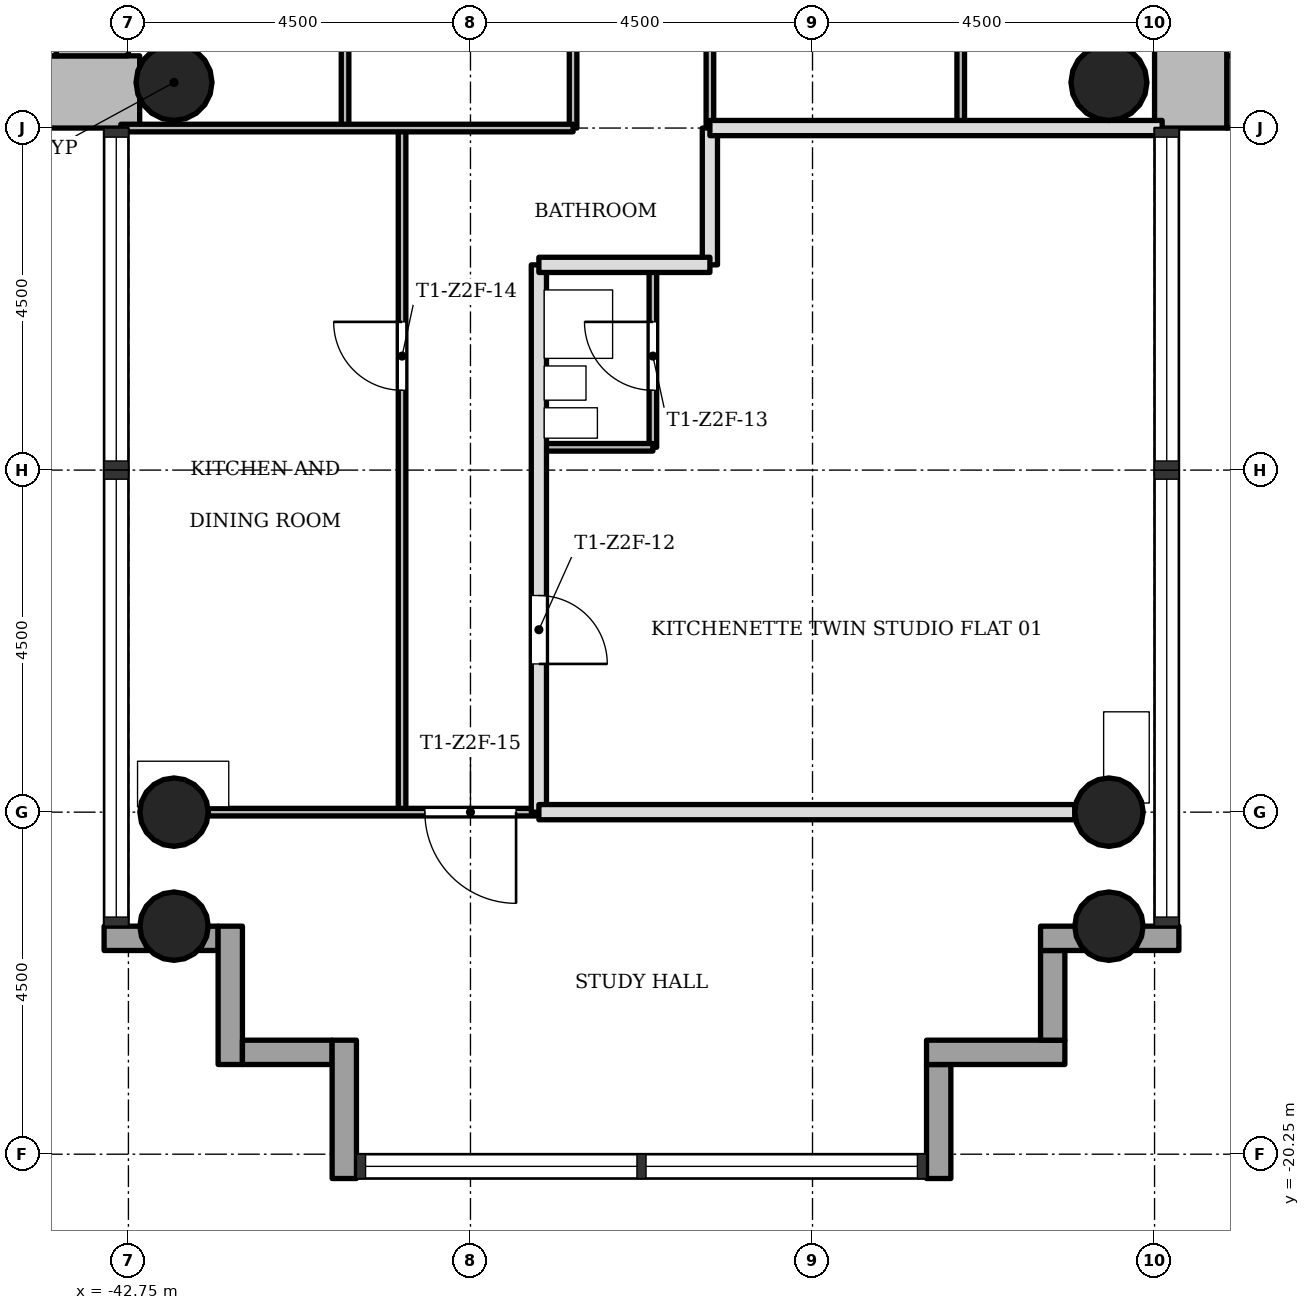
"""IFC4 building model, lengths in metres.
Left out: names, types, materials, properties, quantities, classifications, styles, units other than length and angle.
Written with IfcOpenShell. Run it as: python <this file> out.ifc"""

import sys

from ifc_helpers import new_model, si_unit, direction, frame, frame_2d, origin, origin_2d, place, context, subcontext, project, spatial, rectangle, hollow_circle, extrude, element, fill, save


model = new_model("IFC4")
c1 = context("Model", 3, precision=1e-05, world=origin(), true_north=direction((0.0, 1.0)))
c2 = subcontext(c1, "Body", "Model", "MODEL_VIEW")
j1 = project(units=[si_unit("LENGTHUNIT", "METRE"), si_unit("PLANEANGLEUNIT", "RADIAN")], contexts=[c1])
p1 = place(None, origin())
s1 = spatial("IfcSite", under=j1, at=p1, CompositionType="ELEMENT")
p2 = place(p1, origin())
s2 = spatial("IfcBuilding", under=s1, at=p2, CompositionType="ELEMENT")
p3 = place(p2, frame((0.0, 0.0, 110.6)))
s3 = spatial("IfcBuildingStorey", under=s2, at=p3, CompositionType="ELEMENT", Elevation=110.6)
p4 = place(p3, frame((-28.3, -6.275, 0.0), z_axis=(0.0, 0.0, 1.0), x_axis=(1.0, 0.0, 0.0)))
e1 = element("IfcWall", 1, at=p4, inside=s3, PredefinedType="SHEAR", context=c2, shape_type="SweptSolid", body=[
    extrude(rectangle(XDim=8.05, YDim=0.95, at=frame_2d((4.025, 0.0))), origin(), (0.0, 0.0, 1.0), 3.4),
])
p5 = place(p3, frame((-28.775, 5.8, 0.0), z_axis=(0.0, 0.0, 1.0), x_axis=(0.0, -1.0, 0.0)))
e2 = element("IfcWall", 2, at=p5, inside=s3, PredefinedType="SHEAR", context=c2, shape_type="SweptSolid", body=[
    extrude(rectangle(XDim=12.55, YDim=0.95, at=frame_2d((6.275, 0.0))), origin(), (0.0, 0.0, 1.0), 3.4),
])
p6 = place(p5, frame((4.9, 0.0, 0.0)))
e3 = element("IfcOpeningElement", 3, at=p6, cuts=e2, PredefinedType="OPENING", context=c2, shape_type="SweptSolid", body=[
    extrude(rectangle(XDim=1.8, YDim=2.1, at=frame_2d((0.9, 1.05))), frame((0.0, 0.485, 0.0), z_axis=(0.0, -1.0, 0.0), x_axis=(1.0, 0.0, 0.0)), (0.0, 0.0, 1.0), 0.97),
])
p7 = place(p3, frame((-51.298, -6.275, 0.0), z_axis=(0.0, 0.0, 1.0), x_axis=(1.0, 0.0, 0.0)))
e4 = element("IfcWall", 4, at=p7, inside=s3, PredefinedType="SHEAR", context=c2, shape_type="SweptSolid", body=[
    extrude(rectangle(XDim=8.696, YDim=0.95, at=frame_2d((4.348, 0.0))), origin(), (0.0, 0.0, 1.0), 3.4),
])
p8 = place(p3, frame((-43.225, -5.8, 0.0), z_axis=(0.0, 0.0, 1.0), x_axis=(0.0, 1.0, 0.0)))
e5 = element("IfcWall", 5, at=p8, inside=s3, PredefinedType="SHEAR", context=c2, shape_type="SweptSolid", body=[
    extrude(rectangle(XDim=12.55, YDim=0.95, at=frame_2d((6.275, 0.0))), origin(), (0.0, 0.0, 1.0), 3.4),
])
p9 = place(p8, frame((4.9, 0.0, 0.0)))
e6 = element("IfcOpeningElement", 6, at=p9, cuts=e5, PredefinedType="OPENING", context=c2, shape_type="SweptSolid", body=[
    extrude(rectangle(XDim=1.8, YDim=2.1, at=frame_2d((0.9, 1.05))), frame((0.0, 0.485, 0.0), z_axis=(0.0, -1.0, 0.0), x_axis=(1.0, 0.0, 0.0)), (0.0, 0.0, 1.0), 0.97),
])
for number, where, z_axis, x_axis in (
    (7, (-42.15, -15.75, 0.0), (0.0, 0.0, 1.0), (1.0, 0.0, 0.0)),
    (8, (-29.85, -15.75, 0.0), (0.0, 0.0, 1.0), (1.0, 0.0, 0.0)),
    (9, (-42.15, -17.25, 0.0), (0.0, 0.0, 1.0), (1.0, 0.0, 0.0)),
    (10, (-29.85, -17.25, 0.0), (0.0, 0.0, 1.0), (1.0, 0.0, 0.0)),
):
    element("IfcColumn", number, at=place(p3, frame(where, z_axis=z_axis, x_axis=x_axis)), inside=s3, PredefinedType="COLUMN", context=c2, shape_type="SweptSolid", body=[
        extrude(hollow_circle(Radius=0.45, WallThickness=0.032, at=origin_2d()), origin(), (0.0, 0.0, 1.0), 3.4),
    ])
for number, where, z_axis, x_axis in (
    (11, (-42.15, -6.15, 0.0), (0.0, 0.0, 1.0), (1.0, 0.0, 0.0)),
    (12, (-29.85, -6.15, 0.0), (0.0, 0.0, 1.0), (1.0, 0.0, 0.0)),
):
    element("IfcColumn", number, at=place(p3, frame(where, z_axis=z_axis, x_axis=x_axis)), inside=s3, PredefinedType="COLUMN", context=c2, shape_type="SweptSolid", body=[
        extrude(hollow_circle(Radius=0.5, WallThickness=0.036, at=origin_2d()), origin(), (0.0, 0.0, 1.0), 3.4),
    ])
p10 = place(p3, frame((-43.07, -17.41, -0.3), z_axis=(0.0, 0.0, 1.0), x_axis=(1.0, 0.0, 0.0)))
e13 = element("IfcWall", 13, at=p10, inside=s3, PredefinedType="STANDARD", context=c2, shape_type="SweptSolid", body=[
    extrude(rectangle(XDim=1.5, YDim=0.32, at=frame_2d((0.75, 0.0))), origin(), (0.0, 0.0, 1.0), 3.4),
])
p11 = place(p3, frame((-41.41, -17.25, -0.3), z_axis=(0.0, 0.0, 1.0), x_axis=(0.0, -1.0, 0.0)))
e14 = element("IfcWall", 14, at=p11, inside=s3, PredefinedType="STANDARD", context=c2, shape_type="SweptSolid", body=[
    extrude(rectangle(XDim=1.82, YDim=0.32, at=frame_2d((0.91, 0.0))), origin(), (0.0, 0.0, 1.0), 3.4),
])
p12 = place(p3, frame((-41.25, -18.91, -0.3), z_axis=(0.0, 0.0, 1.0), x_axis=(1.0, 0.0, 0.0)))
e15 = element("IfcWall", 15, at=p12, inside=s3, PredefinedType="STANDARD", context=c2, shape_type="SweptSolid", body=[
    extrude(rectangle(XDim=1.18, YDim=0.32, at=frame_2d((0.59, 0.0))), origin(), (0.0, 0.0, 1.0), 3.4),
])
p13 = place(p3, frame((-39.91, -18.75, -0.3), z_axis=(0.0, 0.0, 1.0), x_axis=(0.0, -1.0, 0.0)))
e16 = element("IfcWall", 16, at=p13, inside=s3, PredefinedType="STANDARD", context=c2, shape_type="SweptSolid", body=[
    extrude(rectangle(XDim=1.82, YDim=0.32, at=frame_2d((0.91, 0.0))), origin(), (0.0, 0.0, 1.0), 3.4),
])
p14 = place(p3, frame((-32.09, -20.57, -0.3), z_axis=(0.0, 0.0, 1.0), x_axis=(0.0, 1.0, 0.0)))
e17 = element("IfcWall", 17, at=p14, inside=s3, PredefinedType="STANDARD", context=c2, shape_type="SweptSolid", body=[
    extrude(rectangle(XDim=1.5, YDim=0.32, at=frame_2d((0.75, 0.0))), origin(), (0.0, 0.0, 1.0), 3.4),
])
p15 = place(p3, frame((-32.25, -18.91, -0.3), z_axis=(0.0, 0.0, 1.0), x_axis=(1.0, 0.0, 0.0)))
e18 = element("IfcWall", 18, at=p15, inside=s3, PredefinedType="STANDARD", context=c2, shape_type="SweptSolid", body=[
    extrude(rectangle(XDim=1.82, YDim=0.32, at=frame_2d((0.91, 0.0))), origin(), (0.0, 0.0, 1.0), 3.4),
])
p16 = place(p3, frame((-30.59, -18.75, -0.3), z_axis=(0.0, 0.0, 1.0), x_axis=(0.0, 1.0, 0.0)))
e19 = element("IfcWall", 19, at=p16, inside=s3, PredefinedType="STANDARD", context=c2, shape_type="SweptSolid", body=[
    extrude(rectangle(XDim=1.18, YDim=0.32, at=frame_2d((0.59, 0.0))), origin(), (0.0, 0.0, 1.0), 3.4),
])
p17 = place(p3, frame((-30.75, -17.41, -0.3), z_axis=(0.0, 0.0, 1.0), x_axis=(1.0, 0.0, 0.0)))
e20 = element("IfcWall", 20, at=p17, inside=s3, PredefinedType="STANDARD", context=c2, shape_type="SweptSolid", body=[
    extrude(rectangle(XDim=1.82, YDim=0.32, at=frame_2d((0.91, 0.0))), origin(), (0.0, 0.0, 1.0), 3.4),
])
p18 = place(p3, frame((-39.9, -6.75, 0.0), z_axis=(0.0, 0.0, 1.0), x_axis=(0.0, 1.0, 0.0)))
e21 = element("IfcWall", 21, at=p18, inside=s3, PredefinedType="PARTITIONING", context=c2, shape_type="SweptSolid", body=[
    extrude(rectangle(XDim=5.25, YDim=0.1, at=frame_2d((2.625, 0.0))), origin(), (0.0, 0.0, 1.0), 3.0),
])
p19 = place(p3, frame((-39.15, -15.75, 0.0), z_axis=(0.0, 0.0, 1.0), x_axis=(0.0, 1.0, 0.0)))
e22 = element("IfcWall", 22, at=p19, inside=s3, PredefinedType="PARTITIONING", context=c2, shape_type="SweptSolid", body=[
    extrude(rectangle(XDim=9.0, YDim=0.1, at=frame_2d((4.5, 0.0))), origin(), (0.0, 0.0, 1.0), 3.0),
])
p20 = place(p19, frame((5.55, 0.0, 0.0)))
e23 = element("IfcOpeningElement", 23, at=p20, cuts=e22, PredefinedType="OPENING", context=c2, shape_type="SweptSolid", body=[
    extrude(rectangle(XDim=0.9, YDim=2.1, at=frame_2d((0.45, 1.05))), frame((0.0, 0.06, 0.0), z_axis=(0.0, -1.0, 0.0), x_axis=(1.0, 0.0, 0.0)), (0.0, 0.0, 1.0), 0.12),
])
p21 = place(p3, frame((-37.35, -15.75, 0.0), z_axis=(0.0, 0.0, 1.0), x_axis=(0.0, 1.0, 0.0)))
e24 = element("IfcWall", 24, at=p21, inside=s3, PredefinedType="SOLIDWALL", context=c2, shape_type="SweptSolid", body=[
    extrude(rectangle(XDim=7.2, YDim=0.2, at=frame_2d((3.6, 0.0))), origin(), (0.0, 0.0, 1.0), 3.0),
])
p22 = place(p21, frame((1.95, 0.0, 0.0)))
e25 = element("IfcOpeningElement", 25, at=p22, cuts=e24, PredefinedType="OPENING", context=c2, shape_type="SweptSolid", body=[
    extrude(rectangle(XDim=0.9, YDim=2.1, at=frame_2d((0.45, 1.05))), frame((0.0, 0.11, 0.0), z_axis=(0.0, -1.0, 0.0), x_axis=(1.0, 0.0, 0.0)), (0.0, 0.0, 1.0), 0.22),
])
p23 = place(p3, frame((-36.9, -6.75, 0.0), z_axis=(0.0, 0.0, 1.0), x_axis=(0.0, 1.0, 0.0)))
e26 = element("IfcWall", 26, at=p23, inside=s3, PredefinedType="PARTITIONING", context=c2, shape_type="SweptSolid", body=[
    extrude(rectangle(XDim=5.25, YDim=0.1, at=frame_2d((2.625, 0.0))), origin(), (0.0, 0.0, 1.0), 3.0),
])
p24 = place(p23, frame((2.175, 0.0, 0.0)))
e27 = element("IfcOpeningElement", 27, at=p24, cuts=e26, PredefinedType="OPENING", context=c2, shape_type="SweptSolid", body=[
    extrude(rectangle(XDim=0.9, YDim=2.1, at=frame_2d((0.45, 1.05))), frame((0.0, 0.06, 0.0), z_axis=(0.0, -1.0, 0.0), x_axis=(1.0, 0.0, 0.0)), (0.0, 0.0, 1.0), 0.12),
])
p25 = place(p3, frame((-35.85, -10.95, 0.0), z_axis=(0.0, 0.0, 1.0), x_axis=(0.0, 1.0, 0.0)))
e28 = element("IfcWall", 28, at=p25, inside=s3, PredefinedType="PARTITIONING", context=c2, shape_type="SweptSolid", body=[
    extrude(rectangle(XDim=2.4, YDim=0.1, at=frame_2d((1.2, 0.0))), origin(), (0.0, 0.0, 1.0), 3.0),
])
p26 = place(p25, frame((0.75, 0.0, 0.0)))
e29 = element("IfcOpeningElement", 29, at=p26, cuts=e28, PredefinedType="OPENING", context=c2, shape_type="SweptSolid", body=[
    extrude(rectangle(XDim=0.9, YDim=2.1, at=frame_2d((0.45, 1.05))), frame((0.0, 0.06, 0.0), z_axis=(0.0, -1.0, 0.0), x_axis=(1.0, 0.0, 0.0)), (0.0, 0.0, 1.0), 0.12),
])
p27 = place(p3, frame((-35.1, -6.75, 0.0), z_axis=(0.0, 0.0, 1.0), x_axis=(0.0, 1.0, 0.0)))
e30 = element("IfcWall", 30, at=p27, inside=s3, PredefinedType="PARTITIONING", context=c2, shape_type="SweptSolid", body=[
    extrude(rectangle(XDim=5.25, YDim=0.1, at=frame_2d((2.625, 0.0))), origin(), (0.0, 0.0, 1.0), 3.0),
])
p28 = place(p27, frame((2.175, 0.0, 0.0)))
e31 = element("IfcOpeningElement", 31, at=p28, cuts=e30, PredefinedType="OPENING", context=c2, shape_type="SweptSolid", body=[
    extrude(rectangle(XDim=0.9, YDim=2.1, at=frame_2d((0.45, 1.05))), frame((0.0, 0.06, 0.0), z_axis=(0.0, -1.0, 0.0), x_axis=(1.0, 0.0, 0.0)), (0.0, 0.0, 1.0), 0.12),
])
p29 = place(p3, frame((-35.1, -8.55, 0.0), z_axis=(0.0, 0.0, 1.0), x_axis=(0.0, 1.0, 0.0)))
e32 = element("IfcWall", 32, at=p29, inside=s3, PredefinedType="SOLIDWALL", context=c2, shape_type="SweptSolid", body=[
    extrude(rectangle(XDim=1.8, YDim=0.2, at=frame_2d((0.9, 0.0))), origin(), (0.0, 0.0, 1.0), 3.0),
])
p30 = place(p3, frame((-31.8, -6.75, 0.0), z_axis=(0.0, 0.0, 1.0), x_axis=(0.0, 1.0, 0.0)))
e33 = element("IfcWall", 33, at=p30, inside=s3, PredefinedType="PARTITIONING", context=c2, shape_type="SweptSolid", body=[
    extrude(rectangle(XDim=5.25, YDim=0.1, at=frame_2d((2.625, 0.0))), origin(), (0.0, 0.0, 1.0), 3.0),
])
p31 = place(p3, frame((-41.7, -15.75, 0.0), z_axis=(0.0, 0.0, 1.0), x_axis=(1.0, 0.0, 0.0)))
e34 = element("IfcWall", 34, at=p31, inside=s3, PredefinedType="PARTITIONING", context=c2, shape_type="SweptSolid", body=[
    extrude(rectangle(XDim=4.35, YDim=0.1, at=frame_2d((2.175, 0.0))), origin(), (0.0, 0.0, 1.0), 3.0),
])
p32 = place(p31, frame((2.85, 0.0, 0.0)))
e35 = element("IfcOpeningElement", 35, at=p32, cuts=e34, PredefinedType="OPENING", context=c2, shape_type="SweptSolid", body=[
    extrude(rectangle(XDim=1.2, YDim=2.1, at=frame_2d((0.6, 1.05))), frame((0.0, 0.06, 0.0), z_axis=(0.0, -1.0, 0.0), x_axis=(1.0, 0.0, 0.0)), (0.0, 0.0, 1.0), 0.12),
])
p33 = place(p3, frame((-37.35, -15.75, 0.0), z_axis=(0.0, 0.0, 1.0), x_axis=(1.0, 0.0, 0.0)))
e36 = element("IfcWall", 36, at=p33, inside=s3, PredefinedType="SOLIDWALL", context=c2, shape_type="SweptSolid", body=[
    extrude(rectangle(XDim=7.05, YDim=0.2, at=frame_2d((3.525, 0.0))), origin(), (0.0, 0.0, 1.0), 3.0),
])
p34 = place(p3, frame((-37.35, -10.95, 0.0), z_axis=(0.0, 0.0, 1.0), x_axis=(1.0, 0.0, 0.0)))
e37 = element("IfcWall", 37, at=p34, inside=s3, PredefinedType="PARTITIONING", context=c2, shape_type="SweptSolid", body=[
    extrude(rectangle(XDim=1.5, YDim=0.1, at=frame_2d((0.75, 0.0))), origin(), (0.0, 0.0, 1.0), 3.0),
])
p35 = place(p3, frame((-37.35, -8.55, 0.0), z_axis=(0.0, 0.0, 1.0), x_axis=(1.0, 0.0, 0.0)))
e38 = element("IfcWall", 38, at=p35, inside=s3, PredefinedType="SOLIDWALL", context=c2, shape_type="SweptSolid", body=[
    extrude(rectangle(XDim=2.25, YDim=0.2, at=frame_2d((1.125, 0.0))), origin(), (0.0, 0.0, 1.0), 3.0),
])
p36 = place(p3, frame((-42.85, -6.75, 0.0), z_axis=(0.0, 0.0, 1.0), x_axis=(1.0, 0.0, 0.0)))
e39 = element("IfcWall", 39, at=p36, inside=s3, PredefinedType="PARTITIONING", context=c2, shape_type="SweptSolid", body=[
    extrude(rectangle(XDim=5.95, YDim=0.1, at=frame_2d((2.975, 0.0))), origin(), (0.0, 0.0, 1.0), 3.0),
])
p37 = place(p3, frame((-35.1, -6.75, 0.0), z_axis=(0.0, 0.0, 1.0), x_axis=(1.0, 0.0, 0.0)))
e40 = element("IfcWall", 40, at=p37, inside=s3, PredefinedType="SOLIDWALL", context=c2, shape_type="SweptSolid", body=[
    extrude(rectangle(XDim=5.95, YDim=0.2, at=frame_2d((2.975, 0.0))), origin(), (0.0, 0.0, 1.0), 3.0),
])
p38 = place(p3, frame((-43.825, -1.9, 0.0), z_axis=(0.0, 0.0, 1.0), x_axis=(0.0, -1.0, 0.0)))
e41 = element("IfcWall", 41, at=p38, inside=s3, PredefinedType="SHEAR", context=c2, shape_type="SweptSolid", body=[
    extrude(rectangle(XDim=3.9, YDim=0.25, at=frame_2d((1.95, 0.0))), origin(), (0.0, 0.0, 1.0), 3.4),
])
p39 = place(p22, origin())
e42 = element("IfcDoor", 42, at=p39, inside=s3, OperationType="SINGLE_SWING_LEFT", PredefinedType="DOOR", context=c2, shape_type="SweptSolid", body=[
    extrude(rectangle(XDim=0.9, YDim=2.1, at=frame_2d((0.45, 1.05))), frame((0.0, 0.025, 0.0), z_axis=(0.0, -1.0, 0.0), x_axis=(1.0, 0.0, 0.0)), (0.0, 0.0, 1.0), 0.05),
])
fill(e25, e42)
p40 = place(p26, origin())
e43 = element("IfcDoor", 43, at=p40, inside=s3, OperationType="SINGLE_SWING_LEFT", PredefinedType="DOOR", context=c2, shape_type="SweptSolid", body=[
    extrude(rectangle(XDim=0.9, YDim=2.1, at=frame_2d((0.45, 1.05))), frame((0.0, 0.025, 0.0), z_axis=(0.0, -1.0, 0.0), x_axis=(1.0, 0.0, 0.0)), (0.0, 0.0, 1.0), 0.05),
])
fill(e29, e43)
p41 = place(p20, origin())
e44 = element("IfcDoor", 44, at=p41, inside=s3, OperationType="SINGLE_SWING_LEFT", PredefinedType="DOOR", context=c2, shape_type="SweptSolid", body=[
    extrude(rectangle(XDim=0.9, YDim=2.1, at=frame_2d((0.45, 1.05))), frame((0.0, 0.025, 0.0), z_axis=(0.0, -1.0, 0.0), x_axis=(1.0, 0.0, 0.0)), (0.0, 0.0, 1.0), 0.05),
])
fill(e23, e44)
p42 = place(p32, origin())
e45 = element("IfcDoor", 45, at=p42, inside=s3, OperationType="SINGLE_SWING_RIGHT", PredefinedType="DOOR", context=c2, shape_type="SweptSolid", body=[
    extrude(rectangle(XDim=1.2, YDim=2.1, at=frame_2d((0.6, 1.05))), frame((0.0, 0.025, 0.0), z_axis=(0.0, -1.0, 0.0), x_axis=(1.0, 0.0, 0.0)), (0.0, 0.0, 1.0), 0.05),
])
fill(e35, e45)
save(model, sys.argv[1])
